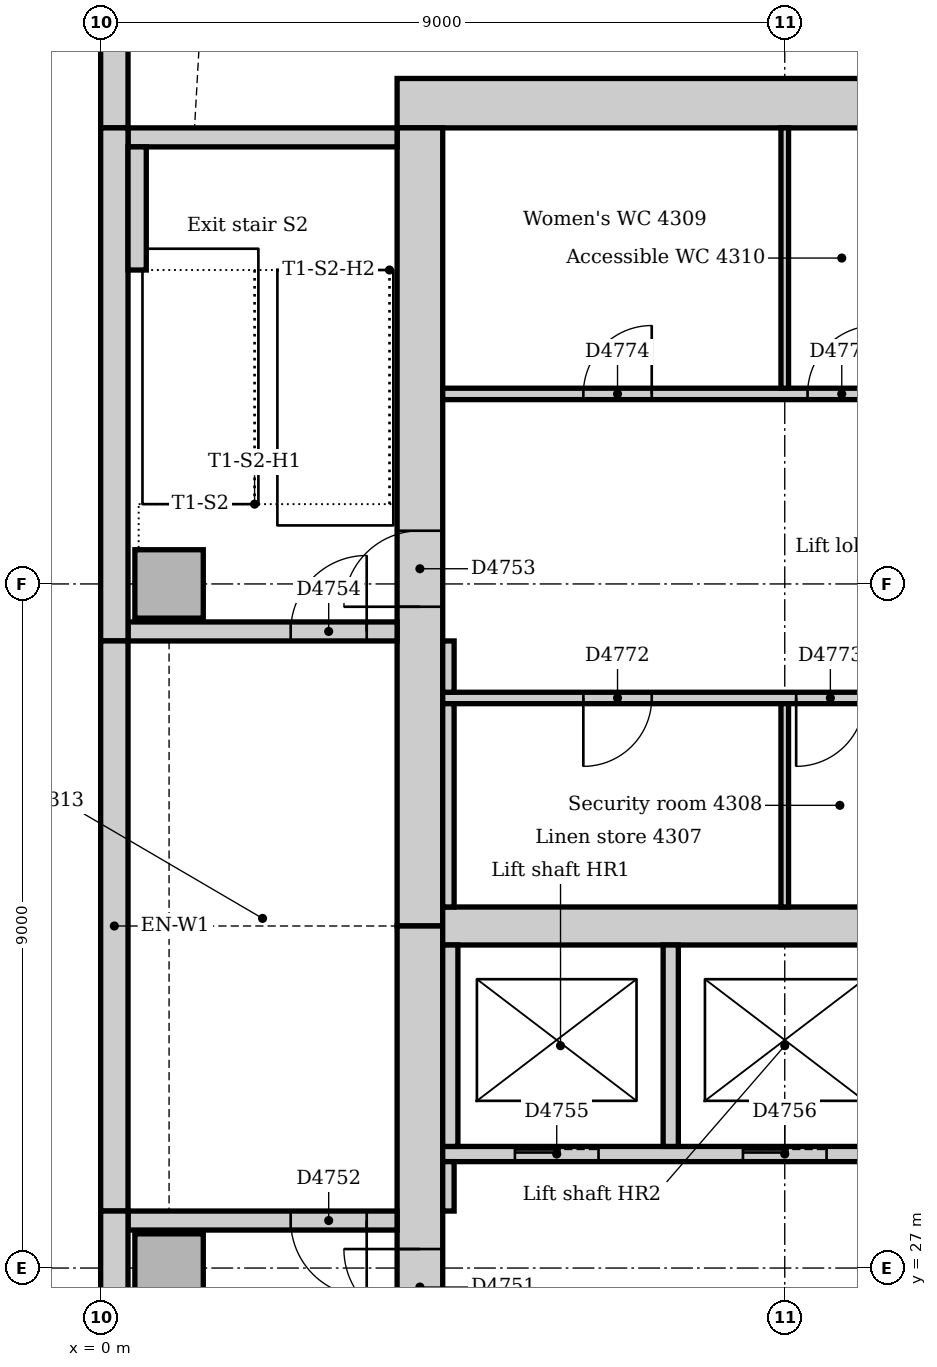
"""IFC4 building model, lengths in metres.
Left out: names, types, materials, properties, quantities, classifications, styles, units other than length and angle.
Written with IfcOpenShell. Run it as: python <this file> out.ifc"""

import sys

from ifc_helpers import new_model, si_unit, direction, frame, frame_2d, origin, origin_2d, place, context, subcontext, project, spatial, rectangle, extrude, element, fill, save


model = new_model("IFC4")
c1 = context("Model", 3, precision=1e-05, world=origin(), true_north=direction((0.0, 1.0)))
c2 = subcontext(c1, "Body", "Model", "MODEL_VIEW")
j1 = project(units=[si_unit("LENGTHUNIT", "METRE"), si_unit("PLANEANGLEUNIT", "RADIAN")], contexts=[c1])
p1 = place(None, origin())
s1 = spatial("IfcSite", under=j1, at=p1, CompositionType="ELEMENT")
p2 = place(p1, origin())
s2 = spatial("IfcBuilding", under=s1, at=p2, CompositionType="ELEMENT")
p3 = place(p2, frame((0.0, 0.0, 181.0)))
s3 = spatial("IfcBuildingStorey", under=s2, at=p3, CompositionType="ELEMENT", Elevation=181.0)
p4 = place(p3, frame((23.15, 42.325, 0.0), z_axis=(0.0, 0.0, 1.0), x_axis=(-1.0, 0.0, 0.0)))
e1 = element("IfcWall", 1, at=p4, inside=s3, PredefinedType="SOLIDWALL", context=c2, shape_type="SweptSolid", body=[
    extrude(rectangle(XDim=19.25, YDim=0.65, at=frame_2d((9.625, 0.0))), origin(), (0.0, 0.0, 1.0), 4.0),
])
p5 = place(p3, frame((4.2, 42.0, 0.0), z_axis=(0.0, 0.0, 1.0), x_axis=(0.0, -1.0, 0.0)))
e2 = element("IfcWall", 2, at=p5, inside=s3, PredefinedType="SOLIDWALL", context=c2, shape_type="SweptSolid", body=[
    extrude(rectangle(XDim=10.5, YDim=0.6, at=frame_2d((5.25, 0.0))), origin(), (0.0, 0.0, 1.0), 4.0),
])
p6 = place(p5, frame((5.3, 0.0, 0.0)))
e3 = element("IfcOpeningElement", 3, at=p6, cuts=e2, PredefinedType="OPENING", context=c2, shape_type="SweptSolid", body=[
    extrude(rectangle(XDim=1.0, YDim=2.1, at=frame_2d((0.5, 1.05))), frame((0.0, 0.31, 0.0), z_axis=(0.0, -1.0, 0.0), x_axis=(1.0, 0.0, 0.0)), (0.0, 0.0, 1.0), 0.62),
])
p7 = place(p3, frame((4.2, 31.5, 0.0), z_axis=(0.0, 0.0, 1.0), x_axis=(0.0, -1.0, 0.0)))
e4 = element("IfcWall", 4, at=p7, inside=s3, PredefinedType="SOLIDWALL", context=c2, shape_type="SweptSolid", body=[
    extrude(rectangle(XDim=10.5, YDim=0.6, at=frame_2d((5.25, 0.0))), origin(), (0.0, 0.0, 1.0), 4.0),
])
p8 = place(p7, frame((4.25, 0.0, 0.0)))
e5 = element("IfcOpeningElement", 5, at=p8, cuts=e4, PredefinedType="OPENING", context=c2, shape_type="SweptSolid", body=[
    extrude(rectangle(XDim=1.0, YDim=2.1, at=frame_2d((0.5, 1.05))), frame((0.0, 0.31, 0.0), z_axis=(0.0, -1.0, 0.0), x_axis=(1.0, 0.0, 0.0)), (0.0, 0.0, 1.0), 0.62),
])
p9 = place(p3, frame((4.5, 31.5, 0.0), z_axis=(0.0, 0.0, 1.0), x_axis=(1.0, 0.0, 0.0)))
e6 = element("IfcWall", 6, at=p9, inside=s3, PredefinedType="SOLIDWALL", context=c2, shape_type="SweptSolid", body=[
    extrude(rectangle(XDim=18.0, YDim=0.5, at=frame_2d((9.0, 0.0))), origin(), (0.0, 0.0, 1.0), 4.0),
])
p10 = place(p3, frame((3.9, 27.625, 0.0), z_axis=(0.0, 0.0, 1.0), x_axis=(-1.0, 0.0, 0.0)))
e7 = element("IfcWall", 7, at=p10, inside=s3, PredefinedType="SOLIDWALL", context=c2, shape_type="SweptSolid", body=[
    extrude(rectangle(XDim=3.54, YDim=0.25, at=frame_2d((1.77, 0.0))), origin(), (0.0, 0.0, 1.0), 4.0),
])
p11 = place(p10, frame((0.4, 0.0, 0.0)))
e8 = element("IfcOpeningElement", 8, at=p11, cuts=e7, PredefinedType="OPENING", context=c2, shape_type="SweptSolid", body=[
    extrude(rectangle(XDim=1.0, YDim=2.1, at=frame_2d((0.5, 1.05))), frame((0.0, 0.135, 0.0), z_axis=(0.0, -1.0, 0.0), x_axis=(1.0, 0.0, 0.0)), (0.0, 0.0, 1.0), 0.27),
])
p12 = place(p3, frame((0.36, 35.375, 0.0), z_axis=(0.0, 0.0, 1.0), x_axis=(1.0, 0.0, 0.0)))
e9 = element("IfcWall", 9, at=p12, inside=s3, PredefinedType="SOLIDWALL", context=c2, shape_type="SweptSolid", body=[
    extrude(rectangle(XDim=3.54, YDim=0.25, at=frame_2d((1.77, 0.0))), origin(), (0.0, 0.0, 1.0), 4.0),
])
p13 = place(p12, frame((2.14, 0.0, 0.0)))
e10 = element("IfcOpeningElement", 10, at=p13, cuts=e9, PredefinedType="OPENING", context=c2, shape_type="SweptSolid", body=[
    extrude(rectangle(XDim=1.0, YDim=2.1, at=frame_2d((0.5, 1.05))), frame((0.0, 0.135, 0.0), z_axis=(0.0, -1.0, 0.0), x_axis=(1.0, 0.0, 0.0)), (0.0, 0.0, 1.0), 0.27),
])
p14 = place(p3, frame((3.9, 41.875, 0.0), z_axis=(0.0, 0.0, 1.0), x_axis=(-1.0, 0.0, 0.0)))
e11 = element("IfcWall", 11, at=p14, inside=s3, PredefinedType="SOLIDWALL", context=c2, shape_type="SweptSolid", body=[
    extrude(rectangle(XDim=3.54, YDim=0.25, at=frame_2d((1.77, 0.0))), origin(), (0.0, 0.0, 1.0), 4.0),
])
for number, where, z_axis, x_axis in (
    (12, (0.9, 27.0, 0.0), (0.0, 0.0, 1.0), (1.0, 0.0, 0.0)),
    (13, (0.9, 36.0, 0.0), (0.0, 0.0, 1.0), (1.0, 0.0, 0.0)),
):
    element("IfcColumn", number, at=place(p3, frame(where, z_axis=z_axis, x_axis=x_axis)), inside=s3, PredefinedType="COLUMN", context=c2, shape_type="SweptSolid", body=[
        extrude(rectangle(XDim=0.9, YDim=0.9, at=origin_2d()), origin(), (0.0, 0.0, 1.0), 4.0),
    ])
p15 = place(p3, frame((0.18, 49.757, 0.0), z_axis=(0.0, 0.0, 1.0), x_axis=(0.0, -1.0, 0.0)))
e14 = element("IfcWall", 14, at=p15, inside=s3, PredefinedType="STANDARD", context=c2, shape_type="SweptSolid", body=[
    extrude(rectangle(XDim=7.757, YDim=0.36, at=frame_2d((3.879, 0.0))), origin(), (0.0, 0.0, 1.0), 3.85),
])
p16 = place(p15, frame((3.107, 0.0, 0.9)))
e15 = element("IfcOpeningElement", 15, at=p16, cuts=e14, PredefinedType="OPENING", context=c2, shape_type="SweptSolid", body=[
    extrude(rectangle(XDim=3.3, YDim=1.6, at=frame_2d((1.65, 0.8))), frame((0.0, 0.19, 0.0), z_axis=(0.0, -1.0, 0.0), x_axis=(1.0, 0.0, 0.0)), (0.0, 0.0, 1.0), 0.38),
])
p17 = place(p3, frame((0.18, 42.0, 0.0), z_axis=(0.0, 0.0, 1.0), x_axis=(0.0, -1.0, 0.0)))
e16 = element("IfcWall", 16, at=p17, inside=s3, PredefinedType="STANDARD", context=c2, shape_type="SweptSolid", body=[
    extrude(rectangle(XDim=6.75, YDim=0.36, at=frame_2d((3.375, 0.0))), origin(), (0.0, 0.0, 1.0), 3.85),
])
p18 = place(p3, frame((0.18, 35.25, 0.0), z_axis=(0.0, 0.0, 1.0), x_axis=(0.0, -1.0, 0.0)))
e17 = element("IfcWall", 17, at=p18, inside=s3, PredefinedType="STANDARD", context=c2, shape_type="SweptSolid", body=[
    extrude(rectangle(XDim=7.5, YDim=0.36, at=frame_2d((3.75, 0.0))), origin(), (0.0, 0.0, 1.0), 3.85),
])
p19 = place(p3, frame((0.18, 27.75, 0.0), z_axis=(0.0, 0.0, 1.0), x_axis=(0.0, -1.0, 0.0)))
e18 = element("IfcWall", 18, at=p19, inside=s3, PredefinedType="STANDARD", context=c2, shape_type="SweptSolid", body=[
    extrude(rectangle(XDim=6.75, YDim=0.36, at=frame_2d((3.375, 0.0))), origin(), (0.0, 0.0, 1.0), 3.85),
])
p20 = place(p3, frame((0.48, 40.13, 0.0), z_axis=(0.0, 0.0, 1.0), x_axis=(0.0, 1.0, 0.0)))
e19 = element("IfcWall", 19, at=p20, inside=s3, PredefinedType="STANDARD", context=c2, shape_type="SweptSolid", body=[
    extrude(rectangle(XDim=1.62, YDim=0.24, at=frame_2d((0.81, 0.0))), origin(), (0.0, 0.0, 1.0), 4.0),
])
p21 = place(p3, frame((4.5, 28.5, 0.0), z_axis=(0.0, 0.0, 1.0), x_axis=(1.0, 0.0, 0.0)))
e20 = element("IfcWall", 20, at=p21, inside=s3, PredefinedType="PARTITIONING", context=c2, shape_type="SweptSolid", body=[
    extrude(rectangle(XDim=18.0, YDim=0.2, at=frame_2d((9.0, 0.0))), origin(), (0.0, 0.0, 1.0), 3.85),
])
p22 = place(p21, frame((0.95, 0.0, 0.0)))
e21 = element("IfcOpeningElement", 21, at=p22, cuts=e20, PredefinedType="OPENING", context=c2, shape_type="SweptSolid", body=[
    extrude(rectangle(XDim=1.1, YDim=2.1, at=frame_2d((0.55, 1.05))), frame((0.0, 0.11, 0.0), z_axis=(0.0, -1.0, 0.0), x_axis=(1.0, 0.0, 0.0)), (0.0, 0.0, 1.0), 0.22),
])
p23 = place(p21, frame((3.95, 0.0, 0.0)))
e22 = element("IfcOpeningElement", 22, at=p23, cuts=e20, PredefinedType="OPENING", context=c2, shape_type="SweptSolid", body=[
    extrude(rectangle(XDim=1.1, YDim=2.1, at=frame_2d((0.55, 1.05))), frame((0.0, 0.11, 0.0), z_axis=(0.0, -1.0, 0.0), x_axis=(1.0, 0.0, 0.0)), (0.0, 0.0, 1.0), 0.22),
])
p24 = place(p21, frame((6.95, 0.0, 0.0)))
e23 = element("IfcOpeningElement", 23, at=p24, cuts=e20, PredefinedType="OPENING", context=c2, shape_type="SweptSolid", body=[
    extrude(rectangle(XDim=1.1, YDim=2.1, at=frame_2d((0.55, 1.05))), frame((0.0, 0.11, 0.0), z_axis=(0.0, -1.0, 0.0), x_axis=(1.0, 0.0, 0.0)), (0.0, 0.0, 1.0), 0.22),
])
p25 = place(p21, frame((9.95, 0.0, 0.0)))
e24 = element("IfcOpeningElement", 24, at=p25, cuts=e20, PredefinedType="OPENING", context=c2, shape_type="SweptSolid", body=[
    extrude(rectangle(XDim=1.1, YDim=2.1, at=frame_2d((0.55, 1.05))), frame((0.0, 0.11, 0.0), z_axis=(0.0, -1.0, 0.0), x_axis=(1.0, 0.0, 0.0)), (0.0, 0.0, 1.0), 0.22),
])
p26 = place(p21, frame((12.95, 0.0, 0.0)))
e25 = element("IfcOpeningElement", 25, at=p26, cuts=e20, PredefinedType="OPENING", context=c2, shape_type="SweptSolid", body=[
    extrude(rectangle(XDim=1.1, YDim=2.1, at=frame_2d((0.55, 1.05))), frame((0.0, 0.11, 0.0), z_axis=(0.0, -1.0, 0.0), x_axis=(1.0, 0.0, 0.0)), (0.0, 0.0, 1.0), 0.22),
])
p27 = place(p21, frame((15.95, 0.0, 0.0)))
e26 = element("IfcOpeningElement", 26, at=p27, cuts=e20, PredefinedType="OPENING", context=c2, shape_type="SweptSolid", body=[
    extrude(rectangle(XDim=1.1, YDim=2.1, at=frame_2d((0.55, 1.05))), frame((0.0, 0.11, 0.0), z_axis=(0.0, -1.0, 0.0), x_axis=(1.0, 0.0, 0.0)), (0.0, 0.0, 1.0), 0.22),
])
for number, where, z_axis, x_axis in (
    (27, (4.6, 28.6, 0.0), (0.0, 0.0, 1.0), (0.0, 1.0, 0.0)),
    (28, (7.5, 28.6, 0.0), (0.0, 0.0, 1.0), (0.0, 1.0, 0.0)),
):
    element("IfcWall", number, at=place(p3, frame(where, z_axis=z_axis, x_axis=x_axis)), inside=s3, PredefinedType="PARTITIONING", context=c2, shape_type="SweptSolid", body=[
        extrude(rectangle(XDim=2.65, YDim=0.2, at=frame_2d((1.325, 0.0))), origin(), (0.0, 0.0, 1.0), 3.85),
    ])
p28 = place(p3, frame((4.5, 38.5, 0.0), z_axis=(0.0, 0.0, 1.0), x_axis=(1.0, 0.0, 0.0)))
e29 = element("IfcWall", 29, at=p28, inside=s3, PredefinedType="PARTITIONING", context=c2, shape_type="SweptSolid", body=[
    extrude(rectangle(XDim=11.9, YDim=0.15, at=frame_2d((5.95, 0.0))), origin(), (0.0, 0.0, 1.0), 3.85),
])
p29 = place(p28, frame((1.85, 0.0, 0.0)))
e30 = element("IfcOpeningElement", 30, at=p29, cuts=e29, PredefinedType="OPENING", context=c2, shape_type="SweptSolid", body=[
    extrude(rectangle(XDim=0.9, YDim=2.1, at=frame_2d((0.45, 1.05))), frame((0.0, 0.085, 0.0), z_axis=(0.0, -1.0, 0.0), x_axis=(1.0, 0.0, 0.0)), (0.0, 0.0, 1.0), 0.17),
])
p30 = place(p28, frame((4.8, 0.0, 0.0)))
e31 = element("IfcOpeningElement", 31, at=p30, cuts=e29, PredefinedType="OPENING", context=c2, shape_type="SweptSolid", body=[
    extrude(rectangle(XDim=0.9, YDim=2.1, at=frame_2d((0.45, 1.05))), frame((0.0, 0.085, 0.0), z_axis=(0.0, -1.0, 0.0), x_axis=(1.0, 0.0, 0.0)), (0.0, 0.0, 1.0), 0.17),
])
p31 = place(p28, frame((7.05, 0.0, 0.0)))
e32 = element("IfcOpeningElement", 32, at=p31, cuts=e29, PredefinedType="OPENING", context=c2, shape_type="SweptSolid", body=[
    extrude(rectangle(XDim=0.9, YDim=2.1, at=frame_2d((0.45, 1.05))), frame((0.0, 0.085, 0.0), z_axis=(0.0, -1.0, 0.0), x_axis=(1.0, 0.0, 0.0)), (0.0, 0.0, 1.0), 0.17),
])
p32 = place(p28, frame((9.95, 0.0, 0.0)))
e33 = element("IfcOpeningElement", 33, at=p32, cuts=e29, PredefinedType="OPENING", context=c2, shape_type="SweptSolid", body=[
    extrude(rectangle(XDim=0.8, YDim=2.1, at=frame_2d((0.4, 1.05))), frame((0.0, 0.085, 0.0), z_axis=(0.0, -1.0, 0.0), x_axis=(1.0, 0.0, 0.0)), (0.0, 0.0, 1.0), 0.17),
])
p33 = place(p3, frame((4.5, 34.5, 0.0), z_axis=(0.0, 0.0, 1.0), x_axis=(1.0, 0.0, 0.0)))
e34 = element("IfcWall", 34, at=p33, inside=s3, PredefinedType="PARTITIONING", context=c2, shape_type="SweptSolid", body=[
    extrude(rectangle(XDim=5.9, YDim=0.15, at=frame_2d((2.95, 0.0))), origin(), (0.0, 0.0, 1.0), 3.85),
])
p34 = place(p33, frame((1.85, 0.0, 0.0)))
e35 = element("IfcOpeningElement", 35, at=p34, cuts=e34, PredefinedType="OPENING", context=c2, shape_type="SweptSolid", body=[
    extrude(rectangle(XDim=0.9, YDim=2.1, at=frame_2d((0.45, 1.05))), frame((0.0, 0.085, 0.0), z_axis=(0.0, -1.0, 0.0), x_axis=(1.0, 0.0, 0.0)), (0.0, 0.0, 1.0), 0.17),
])
p35 = place(p33, frame((4.65, 0.0, 0.0)))
e36 = element("IfcOpeningElement", 36, at=p35, cuts=e34, PredefinedType="OPENING", context=c2, shape_type="SweptSolid", body=[
    extrude(rectangle(XDim=0.9, YDim=2.1, at=frame_2d((0.45, 1.05))), frame((0.0, 0.085, 0.0), z_axis=(0.0, -1.0, 0.0), x_axis=(1.0, 0.0, 0.0)), (0.0, 0.0, 1.0), 0.17),
])
p36 = place(p3, frame((4.575, 34.575, 0.0), z_axis=(0.0, 0.0, 1.0), x_axis=(0.0, 1.0, 0.0)))
e37 = element("IfcWall", 37, at=p36, inside=s3, PredefinedType="PARTITIONING", context=c2, shape_type="SweptSolid", body=[
    extrude(rectangle(XDim=0.675, YDim=0.15, at=frame_2d((0.338, 0.0))), origin(), (0.0, 0.0, 1.0), 3.85),
])
p37 = place(p3, frame((4.575, 31.75, 0.0), z_axis=(0.0, 0.0, 1.0), x_axis=(0.0, 1.0, 0.0)))
e38 = element("IfcWall", 38, at=p37, inside=s3, PredefinedType="PARTITIONING", context=c2, shape_type="SweptSolid", body=[
    extrude(rectangle(XDim=2.675, YDim=0.15, at=frame_2d((1.337, 0.0))), origin(), (0.0, 0.0, 1.0), 3.85),
])
p38 = place(p3, frame((4.575, 27.75, 0.0), z_axis=(0.0, 0.0, 1.0), x_axis=(0.0, 1.0, 0.0)))
e39 = element("IfcWall", 39, at=p38, inside=s3, PredefinedType="PARTITIONING", context=c2, shape_type="SweptSolid", body=[
    extrude(rectangle(XDim=0.65, YDim=0.15, at=frame_2d((0.325, 0.0))), origin(), (0.0, 0.0, 1.0), 3.85),
])
p39 = place(p3, frame((9.0, 38.575, 0.0), z_axis=(0.0, 0.0, 1.0), x_axis=(0.0, 1.0, 0.0)))
e40 = element("IfcWall", 40, at=p39, inside=s3, PredefinedType="PARTITIONING", context=c2, shape_type="SweptSolid", body=[
    extrude(rectangle(XDim=3.425, YDim=0.1, at=frame_2d((1.712, 0.0))), origin(), (0.0, 0.0, 1.0), 3.85),
])
p40 = place(p3, frame((9.0, 31.75, 0.0), z_axis=(0.0, 0.0, 1.0), x_axis=(0.0, 1.0, 0.0)))
e41 = element("IfcWall", 41, at=p40, inside=s3, PredefinedType="PARTITIONING", context=c2, shape_type="SweptSolid", body=[
    extrude(rectangle(XDim=2.675, YDim=0.1, at=frame_2d((1.337, 0.0))), origin(), (0.0, 0.0, 1.0), 3.85),
])
p41 = place(p8, frame((1.0, 0.0, 0.0), z_axis=(0.0, 0.0, 1.0), x_axis=(-1.0, 0.0, 0.0)))
e42 = element("IfcDoor", 42, at=p41, inside=s3, OperationType="SINGLE_SWING_RIGHT", PredefinedType="DOOR", context=c2, shape_type="SweptSolid", body=[
    extrude(rectangle(XDim=1.0, YDim=2.1, at=frame_2d((0.5, 1.05))), frame((0.0, 0.025, 0.0), z_axis=(0.0, -1.0, 0.0), x_axis=(1.0, 0.0, 0.0)), (0.0, 0.0, 1.0), 0.05),
])
fill(e5, e42)
p42 = place(p11, origin())
e43 = element("IfcDoor", 43, at=p42, inside=s3, OperationType="SINGLE_SWING_LEFT", PredefinedType="DOOR", context=c2, shape_type="SweptSolid", body=[
    extrude(rectangle(XDim=1.0, YDim=2.1, at=frame_2d((0.5, 1.05))), frame((0.0, 0.025, 0.0), z_axis=(0.0, -1.0, 0.0), x_axis=(1.0, 0.0, 0.0)), (0.0, 0.0, 1.0), 0.05),
])
fill(e8, e43)
p43 = place(p6, frame((1.0, 0.0, 0.0), z_axis=(0.0, 0.0, 1.0), x_axis=(-1.0, 0.0, 0.0)))
e44 = element("IfcDoor", 44, at=p43, inside=s3, OperationType="SINGLE_SWING_LEFT", PredefinedType="DOOR", context=c2, shape_type="SweptSolid", body=[
    extrude(rectangle(XDim=1.0, YDim=2.1, at=frame_2d((0.5, 1.05))), frame((0.0, 0.025, 0.0), z_axis=(0.0, -1.0, 0.0), x_axis=(1.0, 0.0, 0.0)), (0.0, 0.0, 1.0), 0.05),
])
fill(e3, e44)
p44 = place(p13, origin())
e45 = element("IfcDoor", 45, at=p44, inside=s3, OperationType="SINGLE_SWING_RIGHT", PredefinedType="DOOR", context=c2, shape_type="SweptSolid", body=[
    extrude(rectangle(XDim=1.0, YDim=2.1, at=frame_2d((0.5, 1.05))), frame((0.0, 0.025, 0.0), z_axis=(0.0, -1.0, 0.0), x_axis=(1.0, 0.0, 0.0)), (0.0, 0.0, 1.0), 0.05),
])
fill(e10, e45)
p45 = place(p22, origin())
e46 = element("IfcDoor", 46, at=p45, inside=s3, OperationType="SLIDING_TO_LEFT", PredefinedType="DOOR", context=c2, shape_type="SweptSolid", body=[
    extrude(rectangle(XDim=1.1, YDim=2.1, at=frame_2d((0.55, 1.05))), frame((0.0, 0.025, 0.0), z_axis=(0.0, -1.0, 0.0), x_axis=(1.0, 0.0, 0.0)), (0.0, 0.0, 1.0), 0.05),
])
fill(e21, e46)
p46 = place(p23, origin())
e47 = element("IfcDoor", 47, at=p46, inside=s3, OperationType="SLIDING_TO_LEFT", PredefinedType="DOOR", context=c2, shape_type="SweptSolid", body=[
    extrude(rectangle(XDim=1.1, YDim=2.1, at=frame_2d((0.55, 1.05))), frame((0.0, 0.025, 0.0), z_axis=(0.0, -1.0, 0.0), x_axis=(1.0, 0.0, 0.0)), (0.0, 0.0, 1.0), 0.05),
])
fill(e22, e47)
p47 = place(p34, frame((0.9, 0.0, 0.0), z_axis=(0.0, 0.0, 1.0), x_axis=(-1.0, 0.0, 0.0)))
e48 = element("IfcDoor", 48, at=p47, inside=s3, OperationType="SINGLE_SWING_RIGHT", PredefinedType="DOOR", context=c2, shape_type="SweptSolid", body=[
    extrude(rectangle(XDim=0.9, YDim=2.1, at=frame_2d((0.45, 1.05))), frame((0.0, 0.025, 0.0), z_axis=(0.0, -1.0, 0.0), x_axis=(1.0, 0.0, 0.0)), (0.0, 0.0, 1.0), 0.05),
])
fill(e35, e48)
p48 = place(p35, frame((0.9, 0.0, 0.0), z_axis=(0.0, 0.0, 1.0), x_axis=(-1.0, 0.0, 0.0)))
e49 = element("IfcDoor", 49, at=p48, inside=s3, OperationType="SINGLE_SWING_RIGHT", PredefinedType="DOOR", context=c2, shape_type="SweptSolid", body=[
    extrude(rectangle(XDim=0.9, YDim=2.1, at=frame_2d((0.45, 1.05))), frame((0.0, 0.025, 0.0), z_axis=(0.0, -1.0, 0.0), x_axis=(1.0, 0.0, 0.0)), (0.0, 0.0, 1.0), 0.05),
])
fill(e36, e49)
p49 = place(p29, origin())
e50 = element("IfcDoor", 50, at=p49, inside=s3, OperationType="SINGLE_SWING_RIGHT", PredefinedType="DOOR", context=c2, shape_type="SweptSolid", body=[
    extrude(rectangle(XDim=0.9, YDim=2.1, at=frame_2d((0.45, 1.05))), frame((0.0, 0.025, 0.0), z_axis=(0.0, -1.0, 0.0), x_axis=(1.0, 0.0, 0.0)), (0.0, 0.0, 1.0), 0.05),
])
fill(e30, e50)
p50 = place(p30, origin())
e51 = element("IfcDoor", 51, at=p50, inside=s3, OperationType="SINGLE_SWING_RIGHT", PredefinedType="DOOR", context=c2, shape_type="SweptSolid", body=[
    extrude(rectangle(XDim=0.9, YDim=2.1, at=frame_2d((0.45, 1.05))), frame((0.0, 0.025, 0.0), z_axis=(0.0, -1.0, 0.0), x_axis=(1.0, 0.0, 0.0)), (0.0, 0.0, 1.0), 0.05),
])
fill(e31, e51)
save(model, sys.argv[1])
